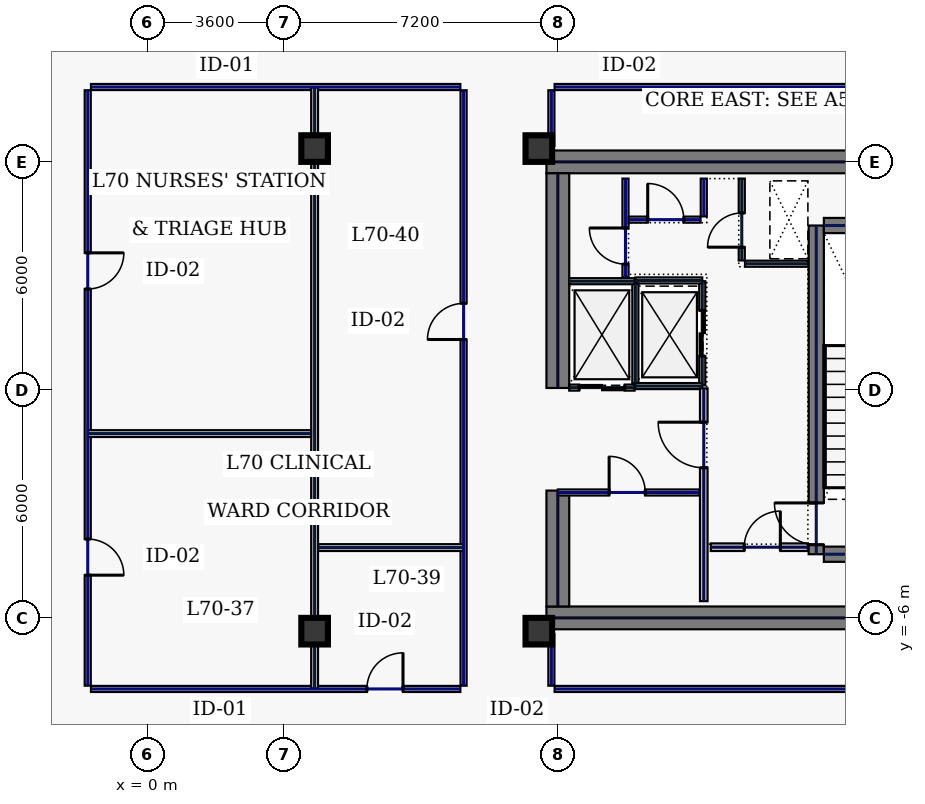
"""IFC4 building model, lengths in metres.
Left out: names, types, materials, properties, quantities, classifications, styles, units other than length and angle.
Written with IfcOpenShell. Run it as: python <this file> out.ifc"""

import sys

from ifc_helpers import new_model, si_unit, direction, frame, frame_2d, origin, origin_2d, place, context, subcontext, project, spatial, rectangle, hollow_rectangle, extrude, element, fill, save


model = new_model("IFC4")
c1 = context("Model", 3, precision=1e-05, world=origin(), true_north=direction((0.0, 1.0)))
c2 = subcontext(c1, "Body", "Model", "MODEL_VIEW")
j1 = project(units=[si_unit("LENGTHUNIT", "METRE"), si_unit("PLANEANGLEUNIT", "RADIAN")], contexts=[c1])
p1 = place(None, origin())
s1 = spatial("IfcSite", under=j1, at=p1, CompositionType="ELEMENT")
p2 = place(p1, origin())
s2 = spatial("IfcBuilding", under=s1, at=p2, CompositionType="ELEMENT")
p3 = place(p2, frame((0.0, 0.0, 301.0)))
s3 = spatial("IfcBuildingStorey", under=s2, at=p3, CompositionType="ELEMENT", Elevation=301.0)
for number, where, z_axis, x_axis in (
    (1, (10.5, 6.0, 0.0), (0.0, 0.0, 1.0), (1.0, 0.0, 0.0)),
    (2, (10.5, -6.0, 0.0), (0.0, 0.0, 1.0), (1.0, 0.0, 0.0)),
):
    element("IfcWall", number, at=place(p3, frame(where, z_axis=z_axis, x_axis=x_axis)), inside=s3, PredefinedType="SHEAR", context=c2, shape_type="SweptSolid", body=[
        extrude(rectangle(XDim=11.5, YDim=0.6, at=frame_2d((5.75, 0.0))), origin(), (0.0, 0.0, 1.0), 3.74),
    ])
p4 = place(p3, frame((10.8, -5.7, 0.0), z_axis=(0.0, 0.0, 1.0), x_axis=(0.0, 1.0, 0.0)))
e3 = element("IfcWall", 3, at=p4, inside=s3, PredefinedType="SHEAR", context=c2, shape_type="SweptSolid", body=[
    extrude(rectangle(XDim=3.05, YDim=0.6, at=frame_2d((1.525, 0.0))), origin(), (0.0, 0.0, 1.0), 3.74),
])
p5 = place(p3, frame((10.8, 0.05, 0.0), z_axis=(0.0, 0.0, 1.0), x_axis=(0.0, 1.0, 0.0)))
e4 = element("IfcWall", 4, at=p5, inside=s3, PredefinedType="SHEAR", context=c2, shape_type="SweptSolid", body=[
    extrude(rectangle(XDim=5.65, YDim=0.6, at=frame_2d((2.825, 0.0))), origin(), (0.0, 0.0, 1.0), 3.74),
])
p6 = place(p3, frame((17.6, -4.325, 0.0), z_axis=(0.0, 0.0, 1.0), x_axis=(0.0, 1.0, 0.0)))
e5 = element("IfcWall", 5, at=p6, inside=s3, PredefinedType="SHEAR", context=c2, shape_type="SweptSolid", body=[
    extrude(rectangle(XDim=8.65, YDim=0.4, at=frame_2d((4.325, 0.0))), origin(), (0.0, 0.0, 1.0), 3.74),
])
p7 = place(p6, frame((0.25, 0.0, 0.0)))
e6 = element("IfcOpeningElement", 6, at=p7, cuts=e5, PredefinedType="OPENING", context=c2, shape_type="SweptSolid", body=[
    extrude(rectangle(XDim=1.1, YDim=2.2, at=frame_2d((0.55, 1.1))), frame((0.0, 0.21, 0.0), z_axis=(0.0, -1.0, 0.0), x_axis=(1.0, 0.0, 0.0)), (0.0, 0.0, 1.0), 0.42),
])
for number, where, z_axis, x_axis in (
    (7, (17.8, -4.325, 0.0), (0.0, 0.0, 1.0), (1.0, 0.0, 0.0)),
    (8, (17.8, 4.325, 0.0), (0.0, 0.0, 1.0), (1.0, 0.0, 0.0)),
):
    element("IfcWall", number, at=place(p3, frame(where, z_axis=z_axis, x_axis=x_axis)), inside=s3, PredefinedType="SHEAR", context=c2, shape_type="SweptSolid", body=[
        extrude(rectangle(XDim=3.4, YDim=0.4, at=frame_2d((1.7, 0.0))), origin(), (0.0, 0.0, 1.0), 3.74),
    ])
for number, where, z_axis, x_axis in (
    (9, (10.3, -6.35, 0.0), (0.0, 0.0, 1.0), (1.0, 0.0, 0.0)),
    (10, (10.3, 6.35, 0.0), (0.0, 0.0, 1.0), (1.0, 0.0, 0.0)),
    (11, (4.4, -6.35, 0.0), (0.0, 0.0, 1.0), (1.0, 0.0, 0.0)),
    (12, (4.4, 6.35, 0.0), (0.0, 0.0, 1.0), (1.0, 0.0, 0.0)),
):
    element("IfcColumn", number, at=place(p3, frame(where, z_axis=z_axis, x_axis=x_axis)), inside=s3, PredefinedType="COLUMN", context=c2, shape_type="SweptSolid", body=[
        extrude(hollow_rectangle(XDim=0.7, YDim=0.7, WallThickness=0.032, at=origin_2d()), origin(), (0.0, 0.0, 1.0), 3.74),
    ])
p8 = place(p3, frame((14.6, 0.12, 0.0), z_axis=(0.0, 0.0, 1.0), x_axis=(0.0, 1.0, 0.0)))
e13 = element("IfcWall", 13, at=p8, inside=s3, PredefinedType="PARTITIONING", context=c2, shape_type="SweptSolid", body=[
    extrude(rectangle(XDim=2.74, YDim=0.16, at=frame_2d((1.37, 0.0))), origin(), (0.0, 0.0, 1.0), 3.74),
])
p9 = place(p8, frame((0.77, 0.0, 0.0)))
e14 = element("IfcOpeningElement", 14, at=p9, cuts=e13, PredefinedType="OPENING", context=c2, shape_type="SweptSolid", body=[
    extrude(rectangle(XDim=1.2, YDim=2.2, at=frame_2d((0.6, 1.1))), frame((0.0, 0.09, 0.0), z_axis=(0.0, -1.0, 0.0), x_axis=(1.0, 0.0, 0.0)), (0.0, 0.0, 1.0), 0.18),
])
for number, where, z_axis, x_axis in (
    (15, (12.84, 0.1, 0.0), (0.0, 0.0, 1.0), (1.0, 0.0, 0.0)),
    (16, (12.84, 2.88, 0.0), (0.0, 0.0, 1.0), (1.0, 0.0, 0.0)),
):
    element("IfcWall", number, at=place(p3, frame(where, z_axis=z_axis, x_axis=x_axis)), inside=s3, PredefinedType="PARTITIONING", context=c2, shape_type="SweptSolid", body=[
        extrude(rectangle(XDim=1.76, YDim=0.16, at=frame_2d((0.88, 0.0))), origin(), (0.0, 0.0, 1.0), 3.74),
    ])
p10 = place(p3, frame((12.84, 0.18, 0.0), z_axis=(0.0, 0.0, 1.0), x_axis=(0.0, 1.0, 0.0)))
e17 = element("IfcWall", 17, at=p10, inside=s3, PredefinedType="PARTITIONING", context=c2, shape_type="SweptSolid", body=[
    extrude(rectangle(XDim=2.62, YDim=0.16, at=frame_2d((1.31, 0.0))), origin(), (0.0, 0.0, 1.0), 3.74),
])
p11 = place(p3, frame((11.1, 0.06, 0.0), z_axis=(0.0, 0.0, 1.0), x_axis=(1.0, 0.0, 0.0)))
e18 = element("IfcWall", 18, at=p11, inside=s3, PredefinedType="PARTITIONING", context=c2, shape_type="SweptSolid", body=[
    extrude(rectangle(XDim=1.72, YDim=0.16, at=frame_2d((0.86, 0.0))), origin(), (0.0, 0.0, 1.0), 3.74),
])
p12 = place(p11, frame((0.26, 0.0, 0.0)))
e19 = element("IfcOpeningElement", 19, at=p12, cuts=e18, PredefinedType="OPENING", context=c2, shape_type="SweptSolid", body=[
    extrude(rectangle(XDim=1.2, YDim=2.2, at=frame_2d((0.6, 1.1))), frame((0.0, 0.09, 0.0), z_axis=(0.0, -1.0, 0.0), x_axis=(1.0, 0.0, 0.0)), (0.0, 0.0, 1.0), 0.18),
])
p13 = place(p3, frame((11.1, 2.86, 0.0), z_axis=(0.0, 0.0, 1.0), x_axis=(1.0, 0.0, 0.0)))
e20 = element("IfcWall", 20, at=p13, inside=s3, PredefinedType="PARTITIONING", context=c2, shape_type="SweptSolid", body=[
    extrude(rectangle(XDim=1.72, YDim=0.16, at=frame_2d((0.86, 0.0))), origin(), (0.0, 0.0, 1.0), 3.74),
])
p14 = place(p3, frame((15.64, 3.405, 0.0), z_axis=(0.0, 0.0, 1.0), x_axis=(0.0, 1.0, 0.0)))
e21 = element("IfcWall", 21, at=p14, inside=s3, PredefinedType="PARTITIONING", context=c2, shape_type="SweptSolid", body=[
    extrude(rectangle(XDim=2.155, YDim=0.16, at=frame_2d((1.078, 0.0))), origin(), (0.0, 0.0, 1.0), 3.74),
])
p15 = place(p14, frame((0.35, 0.0, 0.0)))
e22 = element("IfcOpeningElement", 22, at=p15, cuts=e21, PredefinedType="OPENING", context=c2, shape_type="SweptSolid", body=[
    extrude(rectangle(XDim=0.9, YDim=2.2, at=frame_2d((0.45, 1.1))), frame((0.0, 0.09, 0.0), z_axis=(0.0, -1.0, 0.0), x_axis=(1.0, 0.0, 0.0)), (0.0, 0.0, 1.0), 0.18),
])
p16 = place(p3, frame((15.725, 3.32, 0.0), z_axis=(0.0, 0.0, 1.0), x_axis=(1.0, 0.0, 0.0)))
e23 = element("IfcWall", 23, at=p16, inside=s3, PredefinedType="PARTITIONING", context=c2, shape_type="SweptSolid", body=[
    extrude(rectangle(XDim=1.655, YDim=0.16, at=frame_2d((0.827, 0.0))), origin(), (0.0, 0.0, 1.0), 3.74),
])
p17 = place(p3, frame((14.825, -4.14, 0.0), z_axis=(0.0, 0.0, 1.0), x_axis=(1.0, 0.0, 0.0)))
e24 = element("IfcWall", 24, at=p17, inside=s3, PredefinedType="SOLIDWALL", context=c2, shape_type="SweptSolid", body=[
    extrude(rectangle(XDim=2.555, YDim=0.2, at=frame_2d((1.277, 0.0))), origin(), (0.0, 0.0, 1.0), 3.74),
])
p18 = place(p17, frame((0.88, 0.0, 0.0)))
e25 = element("IfcOpeningElement", 25, at=p18, cuts=e24, PredefinedType="OPENING", context=c2, shape_type="SweptSolid", body=[
    extrude(rectangle(XDim=0.95, YDim=2.2, at=frame_2d((0.475, 1.1))), frame((0.0, 0.11, 0.0), z_axis=(0.0, -1.0, 0.0), x_axis=(1.0, 0.0, 0.0)), (0.0, 0.0, 1.0), 0.22),
])
p19 = place(p3, frame((10.8, -2.7, 0.0), z_axis=(0.0, 0.0, 1.0), x_axis=(1.0, 0.0, 0.0)))
e26 = element("IfcWall", 26, at=p19, inside=s3, PredefinedType="PARTITIONING", context=c2, shape_type="SweptSolid", body=[
    extrude(rectangle(XDim=3.735, YDim=0.16, at=frame_2d((1.867, 0.0))), origin(), (0.0, 0.0, 1.0), 3.74),
])
p20 = place(p19, frame((1.35, 0.0, 0.0)))
e27 = element("IfcOpeningElement", 27, at=p20, cuts=e26, PredefinedType="OPENING", context=c2, shape_type="SweptSolid", body=[
    extrude(rectangle(XDim=0.95, YDim=2.2, at=frame_2d((0.475, 1.1))), frame((0.0, 0.09, 0.0), z_axis=(0.0, -1.0, 0.0), x_axis=(1.0, 0.0, 0.0)), (0.0, 0.0, 1.0), 0.18),
])
p21 = place(p3, frame((12.58, 2.96, 0.0), z_axis=(0.0, 0.0, 1.0), x_axis=(0.0, 1.0, 0.0)))
e28 = element("IfcWall", 28, at=p21, inside=s3, PredefinedType="PARTITIONING", context=c2, shape_type="SweptSolid", body=[
    extrude(rectangle(XDim=2.6, YDim=0.16, at=frame_2d((1.3, 0.0))), origin(), (0.0, 0.0, 1.0), 3.74),
])
p22 = place(p21, frame((0.35, 0.0, 0.0)))
e29 = element("IfcOpeningElement", 29, at=p22, cuts=e28, PredefinedType="OPENING", context=c2, shape_type="SweptSolid", body=[
    extrude(rectangle(XDim=0.95, YDim=2.2, at=frame_2d((0.475, 1.1))), frame((0.0, 0.09, 0.0), z_axis=(0.0, -1.0, 0.0), x_axis=(1.0, 0.0, 0.0)), (0.0, 0.0, 1.0), 0.18),
])
p23 = place(p3, frame((12.665, 4.48, 0.0), z_axis=(0.0, 0.0, 1.0), x_axis=(1.0, 0.0, 0.0)))
e30 = element("IfcWall", 30, at=p23, inside=s3, PredefinedType="PARTITIONING", context=c2, shape_type="SweptSolid", body=[
    extrude(rectangle(XDim=1.89, YDim=0.16, at=frame_2d((0.945, 0.0))), origin(), (0.0, 0.0, 1.0), 3.74),
])
p24 = place(p23, frame((0.5, 0.0, 0.0)))
e31 = element("IfcOpeningElement", 31, at=p24, cuts=e30, PredefinedType="OPENING", context=c2, shape_type="SweptSolid", body=[
    extrude(rectangle(XDim=0.95, YDim=2.2, at=frame_2d((0.475, 1.1))), frame((0.0, 0.09, 0.0), z_axis=(0.0, -1.0, 0.0), x_axis=(1.0, 0.0, 0.0)), (0.0, 0.0, 1.0), 0.18),
])
p25 = place(p3, frame((14.64, 4.565, 0.0), z_axis=(0.0, 0.0, 1.0), x_axis=(0.0, 1.0, 0.0)))
e32 = element("IfcWall", 32, at=p25, inside=s3, PredefinedType="PARTITIONING", context=c2, shape_type="SweptSolid", body=[
    extrude(rectangle(XDim=0.995, YDim=0.16, at=frame_2d((0.498, 0.0))), origin(), (0.0, 0.0, 1.0), 3.74),
])
p26 = place(p3, frame((14.64, -5.56, 0.0), z_axis=(0.0, 0.0, 1.0), x_axis=(0.0, 1.0, 0.0)))
e33 = element("IfcWall", 33, at=p26, inside=s3, PredefinedType="SOLIDWALL", context=c2, shape_type="SweptSolid", body=[
    extrude(rectangle(XDim=5.6, YDim=0.2, at=frame_2d((2.8, 0.0))), origin(), (0.0, 0.0, 1.0), 3.74),
])
p27 = place(p26, frame((3.51, 0.0, 0.0)))
e34 = element("IfcOpeningElement", 34, at=p27, cuts=e33, PredefinedType="OPENING", context=c2, shape_type="SweptSolid", body=[
    extrude(rectangle(XDim=1.2, YDim=2.2, at=frame_2d((0.6, 1.1))), frame((0.0, 0.11, 0.0), z_axis=(0.0, -1.0, 0.0), x_axis=(1.0, 0.0, 0.0)), (0.0, 0.0, 1.0), 0.22),
])
p28 = place(p3, frame((21.915, 7.97, 0.0), z_axis=(0.0, 0.0, 1.0), x_axis=(-1.0, 0.0, 0.0)))
e35 = element("IfcWall", 35, at=p28, inside=s3, PredefinedType="PARTITIONING", context=c2, shape_type="SweptSolid", body=[
    extrude(rectangle(XDim=11.2, YDim=0.16, at=frame_2d((5.6, 0.0))), origin(), (0.0, 0.0, 1.0), 3.74),
])
p29 = place(p3, frame((10.63, 7.885, 0.0), z_axis=(0.0, 0.0, 1.0), x_axis=(0.0, -1.0, 0.0)))
e36 = element("IfcWall", 36, at=p29, inside=s3, PredefinedType="PARTITIONING", context=c2, shape_type="SweptSolid", body=[
    extrude(rectangle(XDim=1.465, YDim=0.16, at=frame_2d((0.732, 0.0))), origin(), (0.0, 0.0, 1.0), 3.74),
])
p30 = place(p3, frame((10.63, -6.42, 0.0), z_axis=(0.0, 0.0, 1.0), x_axis=(0.0, -1.0, 0.0)))
e37 = element("IfcWall", 37, at=p30, inside=s3, PredefinedType="PARTITIONING", context=c2, shape_type="SweptSolid", body=[
    extrude(rectangle(XDim=1.365, YDim=0.16, at=frame_2d((0.683, 0.0))), origin(), (0.0, 0.0, 1.0), 3.74),
])
p31 = place(p3, frame((10.715, -7.87, 0.0), z_axis=(0.0, 0.0, 1.0), x_axis=(1.0, 0.0, 0.0)))
e38 = element("IfcWall", 38, at=p31, inside=s3, PredefinedType="PARTITIONING", context=c2, shape_type="SweptSolid", body=[
    extrude(rectangle(XDim=11.2, YDim=0.16, at=frame_2d((5.6, 0.0))), origin(), (0.0, 0.0, 1.0), 3.74),
])
p32 = place(p3, frame((8.235, 7.97, 0.0), z_axis=(0.0, 0.0, 1.0), x_axis=(-1.0, 0.0, 0.0)))
e39 = element("IfcWall", 39, at=p32, inside=s3, PredefinedType="PARTITIONING", context=c2, shape_type="SweptSolid", body=[
    extrude(rectangle(XDim=9.72, YDim=0.16, at=frame_2d((4.86, 0.0))), origin(), (0.0, 0.0, 1.0), 3.74),
])
p33 = place(p3, frame((-1.57, 7.885, 0.0), z_axis=(0.0, 0.0, 1.0), x_axis=(0.0, -1.0, 0.0)))
e40 = element("IfcWall", 40, at=p33, inside=s3, PredefinedType="PARTITIONING", context=c2, shape_type="SweptSolid", body=[
    extrude(rectangle(XDim=15.67, YDim=0.16, at=frame_2d((7.835, 0.0))), origin(), (0.0, 0.0, 1.0), 3.74),
])
p34 = place(p33, frame((11.811, 0.0, 0.0)))
e41 = element("IfcOpeningElement", 41, at=p34, cuts=e40, PredefinedType="OPENING", context=c2, shape_type="SweptSolid", body=[
    extrude(rectangle(XDim=0.95, YDim=2.2, at=frame_2d((0.475, 1.1))), frame((0.0, 0.09, 0.0), z_axis=(0.0, -1.0, 0.0), x_axis=(1.0, 0.0, 0.0)), (0.0, 0.0, 1.0), 0.18),
])
p35 = place(p33, frame((4.279, 0.0, 0.0)))
e42 = element("IfcOpeningElement", 42, at=p35, cuts=e40, PredefinedType="OPENING", context=c2, shape_type="SweptSolid", body=[
    extrude(rectangle(XDim=0.95, YDim=2.2, at=frame_2d((0.475, 1.1))), frame((0.0, 0.09, 0.0), z_axis=(0.0, -1.0, 0.0), x_axis=(1.0, 0.0, 0.0)), (0.0, 0.0, 1.0), 0.18),
])
p36 = place(p3, frame((-1.485, -7.87, 0.0), z_axis=(0.0, 0.0, 1.0), x_axis=(1.0, 0.0, 0.0)))
e43 = element("IfcWall", 43, at=p36, inside=s3, PredefinedType="PARTITIONING", context=c2, shape_type="SweptSolid", body=[
    extrude(rectangle(XDim=9.72, YDim=0.16, at=frame_2d((4.86, 0.0))), origin(), (0.0, 0.0, 1.0), 3.74),
])
p37 = place(p36, frame((7.261, 0.0, 0.0)))
e44 = element("IfcOpeningElement", 44, at=p37, cuts=e43, PredefinedType="OPENING", context=c2, shape_type="SweptSolid", body=[
    extrude(rectangle(XDim=0.95, YDim=2.2, at=frame_2d((0.475, 1.1))), frame((0.0, 0.09, 0.0), z_axis=(0.0, -1.0, 0.0), x_axis=(1.0, 0.0, 0.0)), (0.0, 0.0, 1.0), 0.18),
])
p38 = place(p3, frame((8.32, -7.785, 0.0), z_axis=(0.0, 0.0, 1.0), x_axis=(0.0, 1.0, 0.0)))
e45 = element("IfcWall", 45, at=p38, inside=s3, PredefinedType="PARTITIONING", context=c2, shape_type="SweptSolid", body=[
    extrude(rectangle(XDim=15.67, YDim=0.16, at=frame_2d((7.835, 0.0))), origin(), (0.0, 0.0, 1.0), 3.74),
])
p39 = place(p38, frame((9.111, 0.0, 0.0)))
e46 = element("IfcOpeningElement", 46, at=p39, cuts=e45, PredefinedType="OPENING", context=c2, shape_type="SweptSolid", body=[
    extrude(rectangle(XDim=0.95, YDim=2.2, at=frame_2d((0.475, 1.1))), frame((0.0, 0.09, 0.0), z_axis=(0.0, -1.0, 0.0), x_axis=(1.0, 0.0, 0.0)), (0.0, 0.0, 1.0), 0.18),
])
p40 = place(p3, frame((4.4, -7.865, 0.0), z_axis=(0.0, 0.0, 1.0), x_axis=(0.0, 1.0, 0.0)))
e47 = element("IfcWall", 47, at=p40, inside=s3, PredefinedType="PARTITIONING", context=c2, shape_type="SweptSolid", body=[
    extrude(rectangle(XDim=15.83, YDim=0.18, at=frame_2d((7.915, 0.0))), origin(), (0.0, 0.0, 1.0), 3.035),
])
p41 = place(p3, frame((-1.565, -1.15, 0.0), z_axis=(0.0, 0.0, 1.0), x_axis=(1.0, 0.0, 0.0)))
e48 = element("IfcWall", 48, at=p41, inside=s3, PredefinedType="PARTITIONING", context=c2, shape_type="SweptSolid", body=[
    extrude(rectangle(XDim=5.87, YDim=0.18, at=frame_2d((2.935, 0.0))), origin(), (0.0, 0.0, 1.0), 3.74),
])
p42 = place(p3, frame((4.495, -4.15, 0.0), z_axis=(0.0, 0.0, 1.0), x_axis=(1.0, 0.0, 0.0)))
e49 = element("IfcWall", 49, at=p42, inside=s3, PredefinedType="PARTITIONING", context=c2, shape_type="SweptSolid", body=[
    extrude(rectangle(XDim=3.82, YDim=0.18, at=frame_2d((1.91, 0.0))), origin(), (0.0, 0.0, 1.0), 3.74),
])
p43 = place(p7, origin())
e50 = element("IfcDoor", 50, at=p43, inside=s3, OperationType="SINGLE_SWING_RIGHT", PredefinedType="DOOR", context=c2, shape_type="SweptSolid", body=[
    extrude(rectangle(XDim=1.1, YDim=2.2, at=frame_2d((0.55, 1.1))), frame((0.0, 0.025, 0.0), z_axis=(0.0, -1.0, 0.0), x_axis=(1.0, 0.0, 0.0)), (0.0, 0.0, 1.0), 0.05),
])
fill(e6, e50)
p44 = place(p9, origin())
e51 = element("IfcDoor", 51, at=p44, inside=s3, OperationType="SLIDING_TO_LEFT", PredefinedType="DOOR", context=c2, shape_type="SweptSolid", body=[
    extrude(rectangle(XDim=1.2, YDim=2.2, at=frame_2d((0.6, 1.1))), frame((0.0, 0.025, 0.0), z_axis=(0.0, -1.0, 0.0), x_axis=(1.0, 0.0, 0.0)), (0.0, 0.0, 1.0), 0.05),
])
fill(e14, e51)
p45 = place(p12, origin())
e52 = element("IfcDoor", 52, at=p45, inside=s3, OperationType="SLIDING_TO_LEFT", PredefinedType="DOOR", context=c2, shape_type="SweptSolid", body=[
    extrude(rectangle(XDim=1.2, YDim=2.2, at=frame_2d((0.6, 1.1))), frame((0.0, 0.025, 0.0), z_axis=(0.0, -1.0, 0.0), x_axis=(1.0, 0.0, 0.0)), (0.0, 0.0, 1.0), 0.05),
])
fill(e19, e52)
p46 = place(p15, origin())
e53 = element("IfcDoor", 53, at=p46, inside=s3, OperationType="SINGLE_SWING_LEFT", PredefinedType="DOOR", context=c2, shape_type="SweptSolid", body=[
    extrude(rectangle(XDim=0.9, YDim=2.2, at=frame_2d((0.45, 1.1))), frame((0.0, 0.025, 0.0), z_axis=(0.0, -1.0, 0.0), x_axis=(1.0, 0.0, 0.0)), (0.0, 0.0, 1.0), 0.05),
])
fill(e22, e53)
p47 = place(p18, origin())
e54 = element("IfcDoor", 54, at=p47, inside=s3, OperationType="SINGLE_SWING_RIGHT", PredefinedType="DOOR", context=c2, shape_type="SweptSolid", body=[
    extrude(rectangle(XDim=0.95, YDim=2.2, at=frame_2d((0.475, 1.1))), frame((0.0, 0.025, 0.0), z_axis=(0.0, -1.0, 0.0), x_axis=(1.0, 0.0, 0.0)), (0.0, 0.0, 1.0), 0.05),
])
fill(e25, e54)
p48 = place(p20, origin())
e55 = element("IfcDoor", 55, at=p48, inside=s3, OperationType="SINGLE_SWING_LEFT", PredefinedType="DOOR", context=c2, shape_type="SweptSolid", body=[
    extrude(rectangle(XDim=0.95, YDim=2.2, at=frame_2d((0.475, 1.1))), frame((0.0, 0.025, 0.0), z_axis=(0.0, -1.0, 0.0), x_axis=(1.0, 0.0, 0.0)), (0.0, 0.0, 1.0), 0.05),
])
fill(e27, e55)
p49 = place(p22, origin())
e56 = element("IfcDoor", 56, at=p49, inside=s3, OperationType="SINGLE_SWING_RIGHT", PredefinedType="DOOR", context=c2, shape_type="SweptSolid", body=[
    extrude(rectangle(XDim=0.95, YDim=2.2, at=frame_2d((0.475, 1.1))), frame((0.0, 0.025, 0.0), z_axis=(0.0, -1.0, 0.0), x_axis=(1.0, 0.0, 0.0)), (0.0, 0.0, 1.0), 0.05),
])
fill(e29, e56)
p50 = place(p24, origin())
e57 = element("IfcDoor", 57, at=p50, inside=s3, OperationType="SINGLE_SWING_LEFT", PredefinedType="DOOR", context=c2, shape_type="SweptSolid", body=[
    extrude(rectangle(XDim=0.95, YDim=2.2, at=frame_2d((0.475, 1.1))), frame((0.0, 0.025, 0.0), z_axis=(0.0, -1.0, 0.0), x_axis=(1.0, 0.0, 0.0)), (0.0, 0.0, 1.0), 0.05),
])
fill(e31, e57)
p51 = place(p27, origin())
e58 = element("IfcDoor", 58, at=p51, inside=s3, OperationType="SINGLE_SWING_RIGHT", PredefinedType="DOOR", context=c2, shape_type="SweptSolid", body=[
    extrude(rectangle(XDim=1.2, YDim=2.2, at=frame_2d((0.6, 1.1))), frame((0.0, 0.025, 0.0), z_axis=(0.0, -1.0, 0.0), x_axis=(1.0, 0.0, 0.0)), (0.0, 0.0, 1.0), 0.05),
])
fill(e34, e58)
p52 = place(p34, origin())
e59 = element("IfcDoor", 59, at=p52, inside=s3, OperationType="SINGLE_SWING_RIGHT", PredefinedType="DOOR", context=c2, shape_type="SweptSolid", body=[
    extrude(rectangle(XDim=0.95, YDim=2.2, at=frame_2d((0.475, 1.1))), frame((0.0, 0.025, 0.0), z_axis=(0.0, -1.0, 0.0), x_axis=(1.0, 0.0, 0.0)), (0.0, 0.0, 1.0), 0.05),
])
fill(e41, e59)
p53 = place(p35, origin())
e60 = element("IfcDoor", 60, at=p53, inside=s3, OperationType="SINGLE_SWING_LEFT", PredefinedType="DOOR", context=c2, shape_type="SweptSolid", body=[
    extrude(rectangle(XDim=0.95, YDim=2.2, at=frame_2d((0.475, 1.1))), frame((0.0, 0.025, 0.0), z_axis=(0.0, -1.0, 0.0), x_axis=(1.0, 0.0, 0.0)), (0.0, 0.0, 1.0), 0.05),
])
fill(e42, e60)
p54 = place(p37, origin())
e61 = element("IfcDoor", 61, at=p54, inside=s3, OperationType="SINGLE_SWING_RIGHT", PredefinedType="DOOR", context=c2, shape_type="SweptSolid", body=[
    extrude(rectangle(XDim=0.95, YDim=2.2, at=frame_2d((0.475, 1.1))), frame((0.0, 0.025, 0.0), z_axis=(0.0, -1.0, 0.0), x_axis=(1.0, 0.0, 0.0)), (0.0, 0.0, 1.0), 0.05),
])
fill(e44, e61)
p55 = place(p39, origin())
e62 = element("IfcDoor", 62, at=p55, inside=s3, OperationType="SINGLE_SWING_LEFT", PredefinedType="DOOR", context=c2, shape_type="SweptSolid", body=[
    extrude(rectangle(XDim=0.95, YDim=2.2, at=frame_2d((0.475, 1.1))), frame((0.0, 0.025, 0.0), z_axis=(0.0, -1.0, 0.0), x_axis=(1.0, 0.0, 0.0)), (0.0, 0.0, 1.0), 0.05),
])
fill(e46, e62)
save(model, sys.argv[1])
